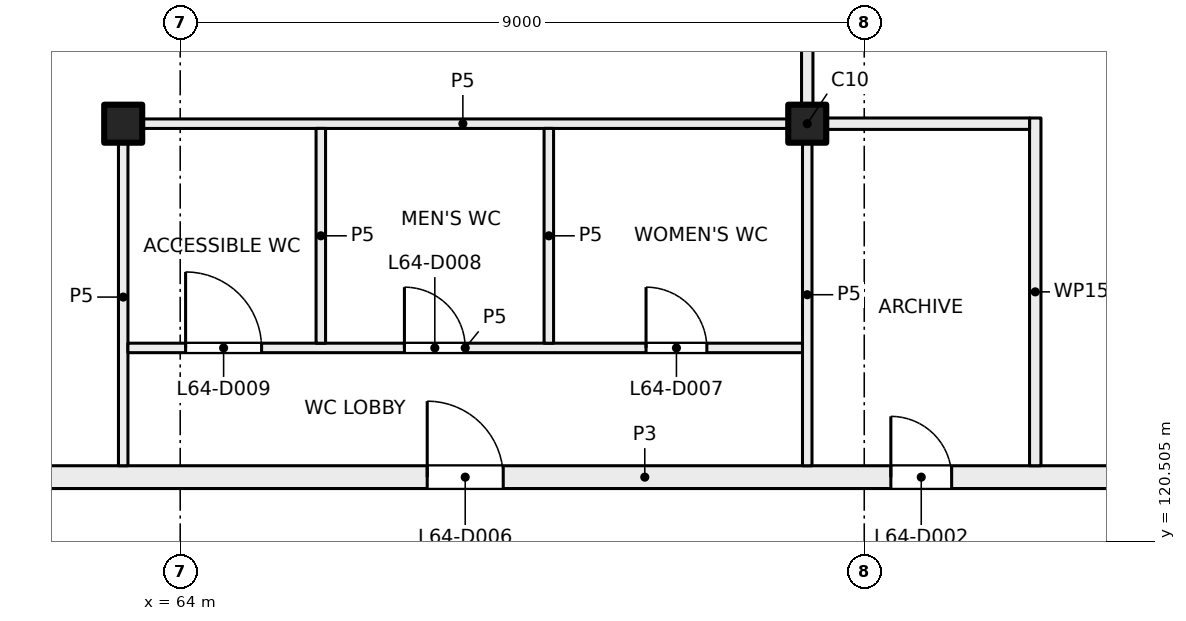
"""IFC4 building model, lengths in metres.
Left out: names, types, materials, properties, quantities, classifications, styles, units other than length and angle.
Written with IfcOpenShell. Run it as: python <this file> out.ifc"""

import sys

from ifc_helpers import new_model, si_unit, direction, frame, frame_2d, origin, origin_2d, place, context, subcontext, project, spatial, rectangle, extrude, element, fill, save


model = new_model("IFC4")
c1 = context("Model", 3, precision=1e-05, world=origin(), true_north=direction((0.0, 1.0)))
c2 = subcontext(c1, "Body", "Model", "MODEL_VIEW")
j1 = project(units=[si_unit("LENGTHUNIT", "METRE"), si_unit("PLANEANGLEUNIT", "RADIAN")], contexts=[c1])
p1 = place(None, origin())
s1 = spatial("IfcSite", under=j1, at=p1, CompositionType="ELEMENT")
p2 = place(p1, origin())
s2 = spatial("IfcBuilding", under=s1, at=p2, CompositionType="ELEMENT")
p3 = place(p2, frame((0.0, 0.0, 269.5)))
s3 = spatial("IfcBuildingStorey", under=s2, at=p3, CompositionType="ELEMENT", Elevation=269.5)
for number, where, z_axis, x_axis in (
    (1, (63.25, 126.0, 0.0), (0.0, 0.0, 1.0), (1.0, 0.0, 0.0)),
    (2, (72.25, 126.0, 0.0), (0.0, 0.0, 1.0), (1.0, 0.0, 0.0)),
):
    element("IfcColumn", number, at=place(p3, frame(where, z_axis=z_axis, x_axis=x_axis)), inside=s3, PredefinedType="COLUMN", context=c2, shape_type="SweptSolid", body=[
        extrude(rectangle(XDim=0.5, YDim=0.5, at=origin_2d()), origin(), (0.0, 0.0, 1.0), 4.0),
    ])
p4 = place(p3, frame((54.4, 121.35, 0.0), z_axis=(0.0, 0.0, 1.0), x_axis=(1.0, 0.0, 0.0)))
e3 = element("IfcWall", 3, at=p4, inside=s3, PredefinedType="PARTITIONING", context=c2, shape_type="SweptSolid", body=[
    extrude(rectangle(XDim=31.425, YDim=0.3, at=frame_2d((15.712, 0.0))), origin(), (0.0, 0.0, 1.0), 3.625),
])
p5 = place(p4, frame((18.95, 0.0, 0.0)))
e4 = element("IfcOpeningElement", 4, at=p5, cuts=e3, PredefinedType="OPENING", context=c2, shape_type="SweptSolid", body=[
    extrude(rectangle(XDim=0.8, YDim=2.1, at=frame_2d((0.4, 1.05))), frame((0.0, 0.16, 0.0), z_axis=(0.0, -1.0, 0.0), x_axis=(1.0, 0.0, 0.0)), (0.0, 0.0, 1.0), 0.32),
])
p6 = place(p4, frame((25.2, 0.0, 0.0)))
e5 = element("IfcOpeningElement", 5, at=p6, cuts=e3, PredefinedType="OPENING", context=c2, shape_type="SweptSolid", body=[
    extrude(rectangle(XDim=1.8, YDim=2.1, at=frame_2d((0.9, 1.05))), frame((0.0, 0.16, 0.0), z_axis=(0.0, -1.0, 0.0), x_axis=(1.0, 0.0, 0.0)), (0.0, 0.0, 1.0), 0.32),
])
p7 = place(p4, frame((12.85, 0.0, 0.0)))
e6 = element("IfcOpeningElement", 6, at=p7, cuts=e3, PredefinedType="OPENING", context=c2, shape_type="SweptSolid", body=[
    extrude(rectangle(XDim=1.0, YDim=2.1, at=frame_2d((0.5, 1.05))), frame((0.0, 0.16, 0.0), z_axis=(0.0, -1.0, 0.0), x_axis=(1.0, 0.0, 0.0)), (0.0, 0.0, 1.0), 0.32),
])
p8 = place(p4, frame((3.515, 0.0, 0.0)))
e7 = element("IfcOpeningElement", 7, at=p8, cuts=e3, PredefinedType="OPENING", context=c2, shape_type="SweptSolid", body=[
    extrude(rectangle(XDim=1.8, YDim=2.1, at=frame_2d((0.9, 1.05))), frame((0.0, 0.16, 0.0), z_axis=(0.0, -1.0, 0.0), x_axis=(1.0, 0.0, 0.0)), (0.0, 0.0, 1.0), 0.32),
])
p9 = place(p3, frame((63.25, 121.5, 0.0), z_axis=(0.0, 0.0, 1.0), x_axis=(0.0, 1.0, 0.0)))
e8 = element("IfcWall", 8, at=p9, inside=s3, PredefinedType="PARTITIONING", context=c2, shape_type="SweptSolid", body=[
    extrude(rectangle(XDim=4.438, YDim=0.125, at=frame_2d((2.219, 0.0))), origin(), (0.0, 0.0, 1.0), 3.625),
])
p10 = place(p3, frame((63.312, 123.05, 0.0), z_axis=(0.0, 0.0, 1.0), x_axis=(1.0, 0.0, 0.0)))
e9 = element("IfcWall", 9, at=p10, inside=s3, PredefinedType="PARTITIONING", context=c2, shape_type="SweptSolid", body=[
    extrude(rectangle(XDim=8.876, YDim=0.125, at=frame_2d((4.438, 0.0))), origin(), (0.0, 0.0, 1.0), 3.625),
])
p11 = place(p10, frame((6.817, 0.0, 0.0)))
e10 = element("IfcOpeningElement", 10, at=p11, cuts=e9, PredefinedType="OPENING", context=c2, shape_type="SweptSolid", body=[
    extrude(rectangle(XDim=0.8, YDim=2.1, at=frame_2d((0.4, 1.05))), frame((0.0, 0.073, 0.0), z_axis=(0.0, -1.0, 0.0), x_axis=(1.0, 0.0, 0.0)), (0.0, 0.0, 1.0), 0.145),
])
p12 = place(p10, frame((3.638, 0.0, 0.0)))
e11 = element("IfcOpeningElement", 11, at=p12, cuts=e9, PredefinedType="OPENING", context=c2, shape_type="SweptSolid", body=[
    extrude(rectangle(XDim=0.8, YDim=2.1, at=frame_2d((0.4, 1.05))), frame((0.0, 0.073, 0.0), z_axis=(0.0, -1.0, 0.0), x_axis=(1.0, 0.0, 0.0)), (0.0, 0.0, 1.0), 0.145),
])
p13 = place(p10, frame((0.759, 0.0, 0.0)))
e12 = element("IfcOpeningElement", 12, at=p13, cuts=e9, PredefinedType="OPENING", context=c2, shape_type="SweptSolid", body=[
    extrude(rectangle(XDim=1.0, YDim=2.1, at=frame_2d((0.5, 1.05))), frame((0.0, 0.073, 0.0), z_axis=(0.0, -1.0, 0.0), x_axis=(1.0, 0.0, 0.0)), (0.0, 0.0, 1.0), 0.145),
])
p14 = place(p3, frame((63.188, 126.0, 0.0), z_axis=(0.0, 0.0, 1.0), x_axis=(1.0, 0.0, 0.0)))
e13 = element("IfcWall", 13, at=p14, inside=s3, PredefinedType="PARTITIONING", context=c2, shape_type="SweptSolid", body=[
    extrude(rectangle(XDim=9.062, YDim=0.125, at=frame_2d((4.531, 0.0))), origin(), (0.0, 0.0, 1.0), 3.625),
])
for number, where, z_axis, x_axis in (
    (14, (65.85, 125.938, 0.0), (0.0, 0.0, 1.0), (0.0, -1.0, 0.0)),
    (15, (68.85, 125.938, 0.0), (0.0, 0.0, 1.0), (0.0, -1.0, 0.0)),
):
    element("IfcWall", number, at=place(p3, frame(where, z_axis=z_axis, x_axis=x_axis)), inside=s3, PredefinedType="PARTITIONING", context=c2, shape_type="SweptSolid", body=[
        extrude(rectangle(XDim=2.826, YDim=0.125, at=frame_2d((1.413, 0.0))), origin(), (0.0, 0.0, 1.0), 3.625),
    ])
p15 = place(p3, frame((72.25, 126.0, 0.0), z_axis=(0.0, 0.0, 1.0), x_axis=(0.0, -1.0, 0.0)))
e16 = element("IfcWall", 16, at=p15, inside=s3, PredefinedType="PARTITIONING", context=c2, shape_type="SweptSolid", body=[
    extrude(rectangle(XDim=4.5, YDim=0.125, at=frame_2d((2.25, 0.0))), origin(), (0.0, 0.0, 1.0), 3.625),
])
p16 = place(p3, frame((72.25, 126.0, 0.0), z_axis=(0.0, 0.0, 1.0), x_axis=(0.0, 1.0, 0.0)))
e17 = element("IfcWall", 17, at=p16, inside=s3, PredefinedType="PARTITIONING", context=c2, shape_type="SweptSolid", body=[
    extrude(rectangle(XDim=3.9, YDim=0.15, at=frame_2d((1.95, 0.0))), origin(), (0.0, 0.0, 1.0), 3.625),
])
p17 = place(p3, frame((75.25, 121.5, 0.0), z_axis=(0.0, 0.0, 1.0), x_axis=(0.0, 1.0, 0.0)))
e18 = element("IfcWall", 18, at=p17, inside=s3, PredefinedType="PARTITIONING", context=c2, shape_type="SweptSolid", body=[
    extrude(rectangle(XDim=4.575, YDim=0.15, at=frame_2d((2.288, 0.0))), origin(), (0.0, 0.0, 1.0), 3.625),
])
p18 = place(p3, frame((75.175, 126.0, 0.0), z_axis=(0.0, 0.0, 1.0), x_axis=(-1.0, 0.0, 0.0)))
e19 = element("IfcWall", 19, at=p18, inside=s3, PredefinedType="PARTITIONING", context=c2, shape_type="SweptSolid", body=[
    extrude(rectangle(XDim=2.925, YDim=0.15, at=frame_2d((1.462, 0.0))), origin(), (0.0, 0.0, 1.0), 3.625),
])
p19 = place(p5, origin())
e20 = element("IfcDoor", 20, at=p19, inside=s3, OperationType="SINGLE_SWING_LEFT", PredefinedType="DOOR", context=c2, shape_type="SweptSolid", body=[
    extrude(rectangle(XDim=0.8, YDim=2.1, at=frame_2d((0.4, 1.05))), frame((0.0, 0.025, 0.0), z_axis=(0.0, -1.0, 0.0), x_axis=(1.0, 0.0, 0.0)), (0.0, 0.0, 1.0), 0.05),
])
fill(e4, e20)
p20 = place(p7, origin())
e21 = element("IfcDoor", 21, at=p20, inside=s3, OperationType="SINGLE_SWING_LEFT", PredefinedType="DOOR", context=c2, shape_type="SweptSolid", body=[
    extrude(rectangle(XDim=1.0, YDim=2.1, at=frame_2d((0.5, 1.05))), frame((0.0, 0.025, 0.0), z_axis=(0.0, -1.0, 0.0), x_axis=(1.0, 0.0, 0.0)), (0.0, 0.0, 1.0), 0.05),
])
fill(e6, e21)
p21 = place(p11, origin())
e22 = element("IfcDoor", 22, at=p21, inside=s3, OperationType="SINGLE_SWING_RIGHT", PredefinedType="DOOR", context=c2, shape_type="SweptSolid", body=[
    extrude(rectangle(XDim=0.8, YDim=2.1, at=frame_2d((0.4, 1.05))), frame((0.0, 0.025, 0.0), z_axis=(0.0, -1.0, 0.0), x_axis=(1.0, 0.0, 0.0)), (0.0, 0.0, 1.0), 0.05),
])
fill(e10, e22)
p22 = place(p12, origin())
e23 = element("IfcDoor", 23, at=p22, inside=s3, OperationType="SINGLE_SWING_LEFT", PredefinedType="DOOR", context=c2, shape_type="SweptSolid", body=[
    extrude(rectangle(XDim=0.8, YDim=2.1, at=frame_2d((0.4, 1.05))), frame((0.0, 0.025, 0.0), z_axis=(0.0, -1.0, 0.0), x_axis=(1.0, 0.0, 0.0)), (0.0, 0.0, 1.0), 0.05),
])
fill(e11, e23)
p23 = place(p13, origin())
e24 = element("IfcDoor", 24, at=p23, inside=s3, OperationType="SINGLE_SWING_LEFT", PredefinedType="DOOR", context=c2, shape_type="SweptSolid", body=[
    extrude(rectangle(XDim=1.0, YDim=2.1, at=frame_2d((0.5, 1.05))), frame((0.0, 0.025, 0.0), z_axis=(0.0, -1.0, 0.0), x_axis=(1.0, 0.0, 0.0)), (0.0, 0.0, 1.0), 0.05),
])
fill(e12, e24)
save(model, sys.argv[1])
